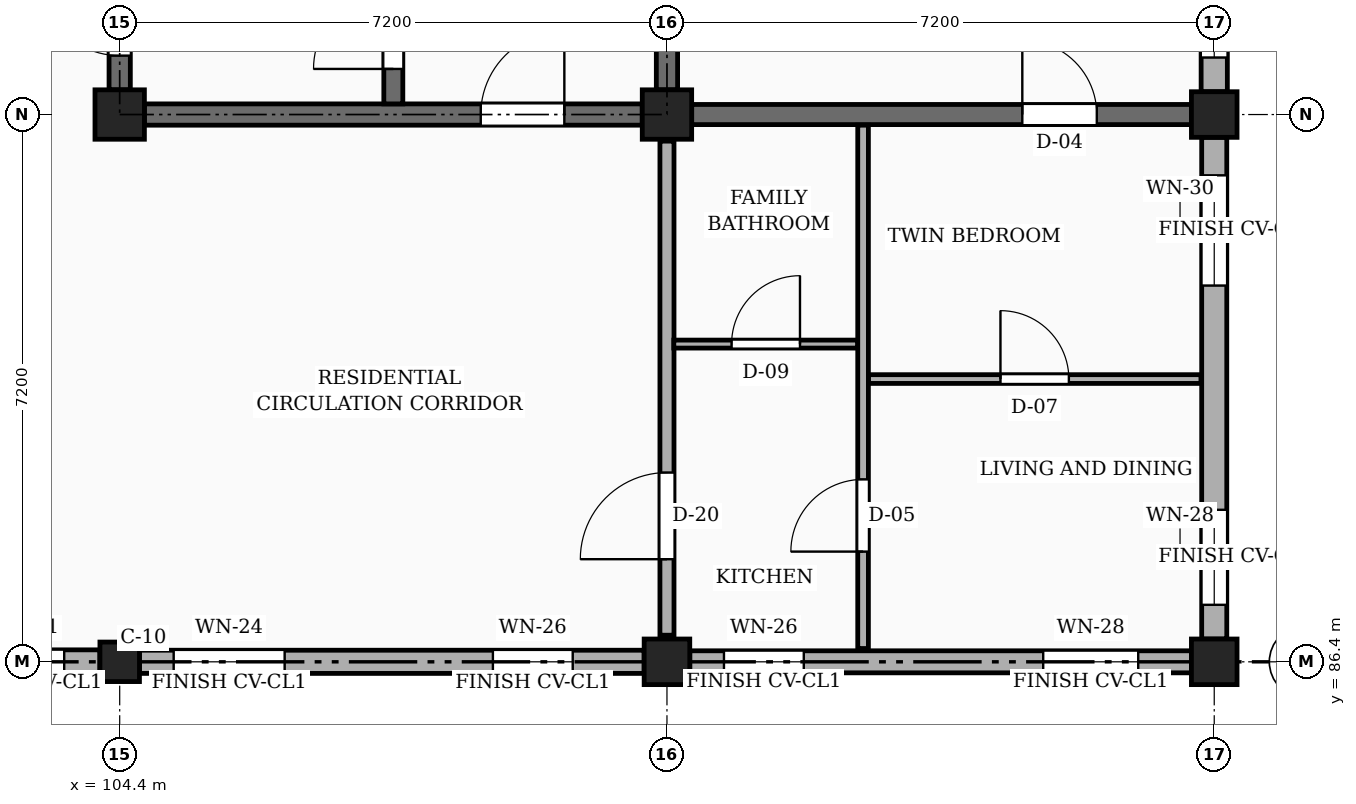
"""IFC4 building model, lengths in metres.
Left out: names, types, materials, properties, quantities, classifications, styles, units other than length and angle.
Written with IfcOpenShell. Run it as: python <this file> out.ifc"""

import sys

from ifc_helpers import new_model, si_unit, direction, frame, frame_2d, origin, origin_2d, place, context, subcontext, project, spatial, rectangle, circle, extrude, element, fill, save


model = new_model("IFC4")
c1 = context("Model", 3, precision=1e-05, world=origin(), true_north=direction((0.0, 1.0)))
c2 = subcontext(c1, "Body", "Model", "MODEL_VIEW")
j1 = project(units=[si_unit("LENGTHUNIT", "METRE"), si_unit("PLANEANGLEUNIT", "RADIAN")], contexts=[c1])
p1 = place(None, origin())
s1 = spatial("IfcSite", under=j1, at=p1, CompositionType="ELEMENT")
p2 = place(p1, origin())
s2 = spatial("IfcBuilding", under=s1, at=p2, CompositionType="ELEMENT")
p3 = place(p2, origin())
s3 = spatial("IfcBuildingStorey", under=s2, at=p3, CompositionType="ELEMENT", Elevation=0.0)
p4 = place(p3, frame((104.4, 86.4, 0.0), z_axis=(0.0, 0.0, 1.0), x_axis=(1.0, 0.0, 0.0)))
e1 = element("IfcColumn", 1, at=p4, inside=s3, PredefinedType="COLUMN", context=c2, shape_type="SweptSolid", body=[
    extrude(circle(Radius=0.26, at=origin_2d()), origin(), (0.0, 0.0, 1.0), 4.5),
])
p5 = place(p3, frame((104.4, 93.6, 0.0), z_axis=(0.0, 0.0, 1.0), x_axis=(1.0, 0.0, 0.0)))
e2 = element("IfcColumn", 2, at=p5, inside=s3, PredefinedType="COLUMN", context=c2, shape_type="SweptSolid", body=[
    extrude(rectangle(XDim=0.65, YDim=0.65, at=origin_2d()), origin(), (0.0, 0.0, 1.0), 4.5),
])
p6 = place(p3, frame((111.6, 86.4, 0.0), z_axis=(0.0, 0.0, 1.0), x_axis=(1.0, 0.0, 0.0)))
e3 = element("IfcColumn", 3, at=p6, inside=s3, PredefinedType="COLUMN", context=c2, shape_type="SweptSolid", body=[
    extrude(rectangle(XDim=0.6, YDim=0.6, at=origin_2d()), origin(), (0.0, 0.0, 1.0), 4.5),
])
p7 = place(p3, frame((111.6, 93.6, 0.0), z_axis=(0.0, 0.0, 1.0), x_axis=(1.0, 0.0, 0.0)))
e4 = element("IfcColumn", 4, at=p7, inside=s3, PredefinedType="COLUMN", context=c2, shape_type="SweptSolid", body=[
    extrude(rectangle(XDim=0.65, YDim=0.65, at=origin_2d()), origin(), (0.0, 0.0, 1.0), 4.5),
])
for number, where, z_axis, x_axis in (
    (5, (118.8, 86.4, 0.0), (0.0, 0.0, 1.0), (1.0, 0.0, 0.0)),
    (6, (118.8, 93.6, 0.0), (0.0, 0.0, 1.0), (1.0, 0.0, 0.0)),
):
    element("IfcColumn", number, at=place(p3, frame(where, z_axis=z_axis, x_axis=x_axis)), inside=s3, PredefinedType="COLUMN", context=c2, shape_type="SweptSolid", body=[
        extrude(rectangle(XDim=0.6, YDim=0.6, at=origin_2d()), origin(), (0.0, 0.0, 1.0), 4.5),
    ])
p8 = place(p3, frame((111.925, 93.6, 0.0), z_axis=(0.0, 0.0, 1.0), x_axis=(1.0, 0.0, 0.0)))
e7 = element("IfcWall", 7, at=p8, inside=s3, PredefinedType="SOLIDWALL", context=c2, shape_type="SweptSolid", body=[
    extrude(rectangle(XDim=6.575, YDim=0.265, at=frame_2d((3.288, 0.0))), origin(), (0.0, 0.0, 1.0), 3.54),
])
p9 = place(p8, frame((4.35, 0.0, 0.0)))
e8 = element("IfcOpeningElement", 8, at=p9, cuts=e7, PredefinedType="OPENING", context=c2, shape_type="SweptSolid", body=[
    extrude(rectangle(XDim=0.98, YDim=2.12, at=frame_2d((0.49, 1.06))), frame((0.0, 0.143, 0.0), z_axis=(0.0, -1.0, 0.0), x_axis=(1.0, 0.0, 0.0)), (0.0, 0.0, 1.0), 0.285),
])
p10 = place(p3, frame((97.5, 86.4, 0.0), z_axis=(0.0, 0.0, 1.0), x_axis=(1.0, 0.0, 0.0)))
e9 = element("IfcWall", 9, at=p10, inside=s3, PredefinedType="SOLIDWALL", context=c2, shape_type="SweptSolid", body=[
    extrude(rectangle(XDim=6.64, YDim=0.315, at=frame_2d((3.32, 0.0))), origin(), (0.0, 0.0, 1.0), 3.81),
])
p11 = place(p10, frame((1.82, 0.0, 0.78)))
e10 = element("IfcOpeningElement", 10, at=p11, cuts=e9, PredefinedType="OPENING", context=c2, shape_type="SweptSolid", body=[
    extrude(rectangle(XDim=1.3, YDim=1.36, at=frame_2d((0.65, 0.68))), frame((0.0, 0.167, 0.0), z_axis=(0.0, -1.0, 0.0), x_axis=(1.0, 0.0, 0.0)), (0.0, 0.0, 1.0), 0.335),
])
p12 = place(p10, frame((5.13, 0.0, 0.78)))
e11 = element("IfcOpeningElement", 11, at=p12, cuts=e9, PredefinedType="OPENING", context=c2, shape_type="SweptSolid", body=[
    extrude(rectangle(XDim=1.04, YDim=1.26, at=frame_2d((0.52, 0.63))), frame((0.0, 0.167, 0.0), z_axis=(0.0, -1.0, 0.0), x_axis=(1.0, 0.0, 0.0)), (0.0, 0.0, 1.0), 0.335),
])
p13 = place(p3, frame((104.66, 86.4, 0.0), z_axis=(0.0, 0.0, 1.0), x_axis=(1.0, 0.0, 0.0)))
e12 = element("IfcWall", 12, at=p13, inside=s3, PredefinedType="SOLIDWALL", context=c2, shape_type="SweptSolid", body=[
    extrude(rectangle(XDim=6.64, YDim=0.305, at=frame_2d((3.32, 0.0))), origin(), (0.0, 0.0, 1.0), 3.81),
])
p14 = place(p13, frame((0.45, 0.0, 0.78)))
e13 = element("IfcOpeningElement", 13, at=p14, cuts=e12, PredefinedType="OPENING", context=c2, shape_type="SweptSolid", body=[
    extrude(rectangle(XDim=1.46, YDim=1.36, at=frame_2d((0.73, 0.68))), frame((0.0, 0.163, 0.0), z_axis=(0.0, -1.0, 0.0), x_axis=(1.0, 0.0, 0.0)), (0.0, 0.0, 1.0), 0.325),
])
p15 = place(p13, frame((4.65, 0.0, 0.78)))
e14 = element("IfcOpeningElement", 14, at=p15, cuts=e12, PredefinedType="OPENING", context=c2, shape_type="SweptSolid", body=[
    extrude(rectangle(XDim=1.05, YDim=1.44, at=frame_2d((0.525, 0.72))), frame((0.0, 0.163, 0.0), z_axis=(0.0, -1.0, 0.0), x_axis=(1.0, 0.0, 0.0)), (0.0, 0.0, 1.0), 0.325),
])
p16 = place(p3, frame((111.9, 86.4, 0.0), z_axis=(0.0, 0.0, 1.0), x_axis=(1.0, 0.0, 0.0)))
e15 = element("IfcWall", 15, at=p16, inside=s3, PredefinedType="SOLIDWALL", context=c2, shape_type="SweptSolid", body=[
    extrude(rectangle(XDim=6.6, YDim=0.29, at=frame_2d((3.3, 0.0))), origin(), (0.0, 0.0, 1.0), 3.81),
])
p17 = place(p16, frame((0.45, 0.0, 0.78)))
e16 = element("IfcOpeningElement", 16, at=p17, cuts=e15, PredefinedType="OPENING", context=c2, shape_type="SweptSolid", body=[
    extrude(rectangle(XDim=1.05, YDim=1.44, at=frame_2d((0.525, 0.72))), frame((0.0, 0.155, 0.0), z_axis=(0.0, -1.0, 0.0), x_axis=(1.0, 0.0, 0.0)), (0.0, 0.0, 1.0), 0.31),
])
p18 = place(p16, frame((4.65, 0.0, 0.78)))
e17 = element("IfcOpeningElement", 17, at=p18, cuts=e15, PredefinedType="OPENING", context=c2, shape_type="SweptSolid", body=[
    extrude(rectangle(XDim=1.25, YDim=1.44, at=frame_2d((0.625, 0.72))), frame((0.0, 0.155, 0.0), z_axis=(0.0, -1.0, 0.0), x_axis=(1.0, 0.0, 0.0)), (0.0, 0.0, 1.0), 0.31),
])
p19 = place(p3, frame((118.8, 86.7, 0.0), z_axis=(0.0, 0.0, 1.0), x_axis=(0.0, 1.0, 0.0)))
e18 = element("IfcWall", 18, at=p19, inside=s3, PredefinedType="SOLIDWALL", context=c2, shape_type="SweptSolid", body=[
    extrude(rectangle(XDim=6.6, YDim=0.33, at=frame_2d((3.3, 0.0))), origin(), (0.0, 0.0, 1.0), 3.81),
])
p20 = place(p19, frame((0.45, 0.0, 0.78)))
e19 = element("IfcOpeningElement", 19, at=p20, cuts=e18, PredefinedType="OPENING", context=c2, shape_type="SweptSolid", body=[
    extrude(rectangle(XDim=1.25, YDim=1.44, at=frame_2d((0.625, 0.72))), frame((0.0, 0.175, 0.0), z_axis=(0.0, -1.0, 0.0), x_axis=(1.0, 0.0, 0.0)), (0.0, 0.0, 1.0), 0.35),
])
p21 = place(p19, frame((4.65, 0.0, 0.78)))
e20 = element("IfcOpeningElement", 20, at=p21, cuts=e18, PredefinedType="OPENING", context=c2, shape_type="SweptSolid", body=[
    extrude(rectangle(XDim=1.45, YDim=1.44, at=frame_2d((0.725, 0.72))), frame((0.0, 0.175, 0.0), z_axis=(0.0, -1.0, 0.0), x_axis=(1.0, 0.0, 0.0)), (0.0, 0.0, 1.0), 0.35),
])
p22 = place(p3, frame((118.8, 93.9, 0.0), z_axis=(0.0, 0.0, 1.0), x_axis=(0.0, 1.0, 0.0)))
e21 = element("IfcWall", 21, at=p22, inside=s3, PredefinedType="SOLIDWALL", context=c2, shape_type="SweptSolid", body=[
    extrude(rectangle(XDim=6.64, YDim=0.345, at=frame_2d((3.32, 0.0))), origin(), (0.0, 0.0, 1.0), 3.81),
])
p23 = place(p22, frame((0.45, 0.0, 0.78)))
e22 = element("IfcOpeningElement", 22, at=p23, cuts=e21, PredefinedType="OPENING", context=c2, shape_type="SweptSolid", body=[
    extrude(rectangle(XDim=1.45, YDim=1.44, at=frame_2d((0.725, 0.72))), frame((0.0, 0.183, 0.0), z_axis=(0.0, -1.0, 0.0), x_axis=(1.0, 0.0, 0.0)), (0.0, 0.0, 1.0), 0.365),
])
p24 = place(p22, frame((4.65, 0.0, 0.78)))
e23 = element("IfcOpeningElement", 23, at=p24, cuts=e21, PredefinedType="OPENING", context=c2, shape_type="SweptSolid", body=[
    extrude(rectangle(XDim=0.92, YDim=1.15, at=frame_2d((0.46, 0.575))), frame((0.0, 0.183, 0.0), z_axis=(0.0, -1.0, 0.0), x_axis=(1.0, 0.0, 0.0)), (0.0, 0.0, 1.0), 0.365),
])
p25 = place(p3, frame((104.4, 93.925, 0.0), z_axis=(0.0, 0.0, 1.0), x_axis=(0.0, 1.0, 0.0)))
e24 = element("IfcWall", 24, at=p25, inside=s3, PredefinedType="SHEAR", context=c2, shape_type="SweptSolid", body=[
    extrude(rectangle(XDim=6.55, YDim=0.28, at=frame_2d((3.275, 0.0))), origin(), (0.0, 0.0, 1.0), 4.24),
])
p26 = place(p25, frame((0.45, 0.0, 0.0)))
e25 = element("IfcOpeningElement", 25, at=p26, cuts=e24, PredefinedType="OPENING", context=c2, shape_type="SweptSolid", body=[
    extrude(rectangle(XDim=1.05, YDim=2.15, at=frame_2d((0.525, 1.075))), frame((0.0, 0.15, 0.0), z_axis=(0.0, -1.0, 0.0), x_axis=(1.0, 0.0, 0.0)), (0.0, 0.0, 1.0), 0.3),
])
p27 = place(p3, frame((111.6, 93.925, 0.0), z_axis=(0.0, 0.0, 1.0), x_axis=(0.0, 1.0, 0.0)))
e26 = element("IfcWall", 26, at=p27, inside=s3, PredefinedType="SHEAR", context=c2, shape_type="SweptSolid", body=[
    extrude(rectangle(XDim=6.55, YDim=0.28, at=frame_2d((3.275, 0.0))), origin(), (0.0, 0.0, 1.0), 4.24),
])
p28 = place(p3, frame((104.725, 93.6, 0.0), z_axis=(0.0, 0.0, 1.0), x_axis=(1.0, 0.0, 0.0)))
e27 = element("IfcWall", 27, at=p28, inside=s3, PredefinedType="SHEAR", context=c2, shape_type="SweptSolid", body=[
    extrude(rectangle(XDim=6.55, YDim=0.28, at=frame_2d((3.275, 0.0))), origin(), (0.0, 0.0, 1.0), 4.24),
])
p29 = place(p28, frame((4.425, 0.0, 0.0)))
e28 = element("IfcOpeningElement", 28, at=p29, cuts=e27, PredefinedType="OPENING", context=c2, shape_type="SweptSolid", body=[
    extrude(rectangle(XDim=1.1, YDim=2.15, at=frame_2d((0.55, 1.075))), frame((0.0, 0.15, 0.0), z_axis=(0.0, -1.0, 0.0), x_axis=(1.0, 0.0, 0.0)), (0.0, 0.0, 1.0), 0.3),
])
p30 = place(p3, frame((108.0, 93.74, 0.0), z_axis=(0.0, 0.0, 1.0), x_axis=(0.0, 1.0, 0.0)))
e29 = element("IfcWall", 29, at=p30, inside=s3, PredefinedType="SHEAR", context=c2, shape_type="SweptSolid", body=[
    extrude(rectangle(XDim=6.92, YDim=0.25, at=frame_2d((3.46, 0.0))), origin(), (0.0, 0.0, 1.0), 4.24),
])
p31 = place(p30, frame((0.46, 0.0, 0.0)))
e30 = element("IfcOpeningElement", 30, at=p31, cuts=e29, PredefinedType="OPENING", context=c2, shape_type="SweptSolid", body=[
    extrude(rectangle(XDim=1.05, YDim=2.15, at=frame_2d((0.525, 1.075))), frame((0.0, 0.135, 0.0), z_axis=(0.0, -1.0, 0.0), x_axis=(1.0, 0.0, 0.0)), (0.0, 0.0, 1.0), 0.27),
])
p32 = place(p3, frame((111.6, 86.75, 0.0), z_axis=(0.0, 0.0, 1.0), x_axis=(0.0, 1.0, 0.0)))
e31 = element("IfcWall", 31, at=p32, inside=s3, PredefinedType="PARTITIONING", context=c2, shape_type="SweptSolid", body=[
    extrude(rectangle(XDim=6.5, YDim=0.185, at=frame_2d((3.25, 0.0))), origin(), (0.0, 0.0, 1.0), 3.49),
])
p33 = place(p32, frame((1.0, 0.0, 0.0)))
e32 = element("IfcOpeningElement", 32, at=p33, cuts=e31, PredefinedType="OPENING", context=c2, shape_type="SweptSolid", body=[
    extrude(rectangle(XDim=1.14, YDim=2.18, at=frame_2d((0.57, 1.09))), frame((0.0, 0.103, 0.0), z_axis=(0.0, -1.0, 0.0), x_axis=(1.0, 0.0, 0.0)), (0.0, 0.0, 1.0), 0.205),
])
p34 = place(p3, frame((114.25, 90.12, 0.0), z_axis=(0.0, 0.0, 1.0), x_axis=(1.0, 0.0, 0.0)))
e33 = element("IfcWall", 33, at=p34, inside=s3, PredefinedType="PARTITIONING", context=c2, shape_type="SweptSolid", body=[
    extrude(rectangle(XDim=4.375, YDim=0.115, at=frame_2d((2.188, 0.0))), origin(), (0.0, 0.0, 1.0), 3.675),
])
p35 = place(p34, frame((1.738, 0.0, 0.0)))
e34 = element("IfcOpeningElement", 34, at=p35, cuts=e33, PredefinedType="OPENING", context=c2, shape_type="SweptSolid", body=[
    extrude(rectangle(XDim=0.9, YDim=2.1, at=frame_2d((0.45, 1.05))), frame((0.0, 0.067, 0.0), z_axis=(0.0, -1.0, 0.0), x_axis=(1.0, 0.0, 0.0)), (0.0, 0.0, 1.0), 0.135),
])
p36 = place(p3, frame((111.69, 90.58, 0.0), z_axis=(0.0, 0.0, 1.0), x_axis=(1.0, 0.0, 0.0)))
e35 = element("IfcWall", 35, at=p36, inside=s3, PredefinedType="PARTITIONING", context=c2, shape_type="SweptSolid", body=[
    extrude(rectangle(XDim=2.42, YDim=0.105, at=frame_2d((1.21, 0.0))), origin(), (0.0, 0.0, 1.0), 3.675),
])
p37 = place(p36, frame((0.76, 0.0, 0.0)))
e36 = element("IfcOpeningElement", 36, at=p37, cuts=e35, PredefinedType="OPENING", context=c2, shape_type="SweptSolid", body=[
    extrude(rectangle(XDim=0.9, YDim=2.05, at=frame_2d((0.45, 1.025))), frame((0.0, 0.062, 0.0), z_axis=(0.0, -1.0, 0.0), x_axis=(1.0, 0.0, 0.0)), (0.0, 0.0, 1.0), 0.125),
])
p38 = place(p3, frame((114.18, 86.575, 0.0), z_axis=(0.0, 0.0, 1.0), x_axis=(0.0, 1.0, 0.0)))
e37 = element("IfcWall", 37, at=p38, inside=s3, PredefinedType="PARTITIONING", context=c2, shape_type="SweptSolid", body=[
    extrude(rectangle(XDim=6.885, YDim=0.14, at=frame_2d((3.442, 0.0))), origin(), (0.0, 0.0, 1.0), 3.675),
])
p39 = place(p38, frame((1.275, 0.0, 0.0)))
e38 = element("IfcOpeningElement", 38, at=p39, cuts=e37, PredefinedType="OPENING", context=c2, shape_type="SweptSolid", body=[
    extrude(rectangle(XDim=0.95, YDim=2.1, at=frame_2d((0.475, 1.05))), frame((0.0, 0.08, 0.0), z_axis=(0.0, -1.0, 0.0), x_axis=(1.0, 0.0, 0.0)), (0.0, 0.0, 1.0), 0.16),
])
p40 = place(p12, origin())
e39 = element("IfcWindow", 39, at=p40, inside=s3, PartitioningType="SINGLE_PANEL", PredefinedType="WINDOW", context=c2, shape_type="SweptSolid", body=[
    extrude(rectangle(XDim=1.04, YDim=1.26, at=frame_2d((0.52, 0.63))), frame((0.0, 0.03, 0.0), z_axis=(0.0, -1.0, 0.0), x_axis=(1.0, 0.0, 0.0)), (0.0, 0.0, 1.0), 0.06),
])
fill(e11, e39)
p41 = place(p14, origin())
e40 = element("IfcWindow", 40, at=p41, inside=s3, PartitioningType="SINGLE_PANEL", PredefinedType="WINDOW", context=c2, shape_type="SweptSolid", body=[
    extrude(rectangle(XDim=1.46, YDim=1.36, at=frame_2d((0.73, 0.68))), frame((0.0, 0.03, 0.0), z_axis=(0.0, -1.0, 0.0), x_axis=(1.0, 0.0, 0.0)), (0.0, 0.0, 1.0), 0.06),
])
fill(e13, e40)
p42 = place(p15, origin())
e41 = element("IfcWindow", 41, at=p42, inside=s3, PartitioningType="SINGLE_PANEL", PredefinedType="WINDOW", context=c2, shape_type="SweptSolid", body=[
    extrude(rectangle(XDim=1.05, YDim=1.44, at=frame_2d((0.525, 0.72))), frame((0.0, 0.03, 0.0), z_axis=(0.0, -1.0, 0.0), x_axis=(1.0, 0.0, 0.0)), (0.0, 0.0, 1.0), 0.06),
])
fill(e14, e41)
p43 = place(p17, origin())
e42 = element("IfcWindow", 42, at=p43, inside=s3, PartitioningType="SINGLE_PANEL", PredefinedType="WINDOW", context=c2, shape_type="SweptSolid", body=[
    extrude(rectangle(XDim=1.05, YDim=1.44, at=frame_2d((0.525, 0.72))), frame((0.0, 0.03, 0.0), z_axis=(0.0, -1.0, 0.0), x_axis=(1.0, 0.0, 0.0)), (0.0, 0.0, 1.0), 0.06),
])
fill(e16, e42)
p44 = place(p18, origin())
e43 = element("IfcWindow", 43, at=p44, inside=s3, PartitioningType="SINGLE_PANEL", PredefinedType="WINDOW", context=c2, shape_type="SweptSolid", body=[
    extrude(rectangle(XDim=1.25, YDim=1.44, at=frame_2d((0.625, 0.72))), frame((0.0, 0.03, 0.0), z_axis=(0.0, -1.0, 0.0), x_axis=(1.0, 0.0, 0.0)), (0.0, 0.0, 1.0), 0.06),
])
fill(e17, e43)
p45 = place(p20, origin())
e44 = element("IfcWindow", 44, at=p45, inside=s3, PartitioningType="SINGLE_PANEL", PredefinedType="WINDOW", context=c2, shape_type="SweptSolid", body=[
    extrude(rectangle(XDim=1.25, YDim=1.44, at=frame_2d((0.625, 0.72))), frame((0.0, 0.03, 0.0), z_axis=(0.0, -1.0, 0.0), x_axis=(1.0, 0.0, 0.0)), (0.0, 0.0, 1.0), 0.06),
])
fill(e19, e44)
p46 = place(p21, origin())
e45 = element("IfcWindow", 45, at=p46, inside=s3, PartitioningType="SINGLE_PANEL", PredefinedType="WINDOW", context=c2, shape_type="SweptSolid", body=[
    extrude(rectangle(XDim=1.45, YDim=1.44, at=frame_2d((0.725, 0.72))), frame((0.0, 0.03, 0.0), z_axis=(0.0, -1.0, 0.0), x_axis=(1.0, 0.0, 0.0)), (0.0, 0.0, 1.0), 0.06),
])
fill(e20, e45)
p47 = place(p23, origin())
e46 = element("IfcWindow", 46, at=p47, inside=s3, PartitioningType="SINGLE_PANEL", PredefinedType="WINDOW", context=c2, shape_type="SweptSolid", body=[
    extrude(rectangle(XDim=1.45, YDim=1.44, at=frame_2d((0.725, 0.72))), frame((0.0, 0.03, 0.0), z_axis=(0.0, -1.0, 0.0), x_axis=(1.0, 0.0, 0.0)), (0.0, 0.0, 1.0), 0.06),
])
fill(e22, e46)
p48 = place(p26, origin())
e47 = element("IfcDoor", 47, at=p48, inside=s3, OperationType="SINGLE_SWING_RIGHT", PredefinedType="DOOR", context=c2, shape_type="SweptSolid", body=[
    extrude(rectangle(XDim=1.05, YDim=2.15, at=frame_2d((0.525, 1.075))), frame((0.0, 0.025, 0.0), z_axis=(0.0, -1.0, 0.0), x_axis=(1.0, 0.0, 0.0)), (0.0, 0.0, 1.0), 0.05),
])
fill(e25, e47)
p49 = place(p29, frame((1.1, 0.0, 0.0), z_axis=(0.0, 0.0, 1.0), x_axis=(-1.0, 0.0, 0.0)))
e48 = element("IfcDoor", 48, at=p49, inside=s3, OperationType="SINGLE_SWING_RIGHT", PredefinedType="DOOR", context=c2, shape_type="SweptSolid", body=[
    extrude(rectangle(XDim=1.1, YDim=2.15, at=frame_2d((0.55, 1.075))), frame((0.0, 0.025, 0.0), z_axis=(0.0, -1.0, 0.0), x_axis=(1.0, 0.0, 0.0)), (0.0, 0.0, 1.0), 0.05),
])
fill(e28, e48)
p50 = place(p31, frame((1.05, 0.0, 0.0), z_axis=(0.0, 0.0, 1.0), x_axis=(-1.0, 0.0, 0.0)))
e49 = element("IfcDoor", 49, at=p50, inside=s3, OperationType="SINGLE_SWING_LEFT", PredefinedType="DOOR", context=c2, shape_type="SweptSolid", body=[
    extrude(rectangle(XDim=1.05, YDim=2.15, at=frame_2d((0.525, 1.075))), frame((0.0, 0.025, 0.0), z_axis=(0.0, -1.0, 0.0), x_axis=(1.0, 0.0, 0.0)), (0.0, 0.0, 1.0), 0.05),
])
fill(e30, e49)
p51 = place(p33, origin())
e50 = element("IfcDoor", 50, at=p51, inside=s3, OperationType="SINGLE_SWING_LEFT", PredefinedType="DOOR", context=c2, shape_type="SweptSolid", body=[
    extrude(rectangle(XDim=1.14, YDim=2.18, at=frame_2d((0.57, 1.09))), frame((0.0, 0.025, 0.0), z_axis=(0.0, -1.0, 0.0), x_axis=(1.0, 0.0, 0.0)), (0.0, 0.0, 1.0), 0.05),
])
fill(e32, e50)
p52 = place(p35, origin())
e51 = element("IfcDoor", 51, at=p52, inside=s3, OperationType="SINGLE_SWING_LEFT", PredefinedType="DOOR", context=c2, shape_type="SweptSolid", body=[
    extrude(rectangle(XDim=0.9, YDim=2.1, at=frame_2d((0.45, 1.05))), frame((0.0, 0.025, 0.0), z_axis=(0.0, -1.0, 0.0), x_axis=(1.0, 0.0, 0.0)), (0.0, 0.0, 1.0), 0.05),
])
fill(e34, e51)
p53 = place(p37, origin())
e52 = element("IfcDoor", 52, at=p53, inside=s3, OperationType="SINGLE_SWING_RIGHT", PredefinedType="DOOR", context=c2, shape_type="SweptSolid", body=[
    extrude(rectangle(XDim=0.9, YDim=2.05, at=frame_2d((0.45, 1.025))), frame((0.0, 0.025, 0.0), z_axis=(0.0, -1.0, 0.0), x_axis=(1.0, 0.0, 0.0)), (0.0, 0.0, 1.0), 0.05),
])
fill(e36, e52)
p54 = place(p39, origin())
e53 = element("IfcDoor", 53, at=p54, inside=s3, OperationType="SINGLE_SWING_LEFT", PredefinedType="DOOR", context=c2, shape_type="SweptSolid", body=[
    extrude(rectangle(XDim=0.95, YDim=2.1, at=frame_2d((0.475, 1.05))), frame((0.0, 0.025, 0.0), z_axis=(0.0, -1.0, 0.0), x_axis=(1.0, 0.0, 0.0)), (0.0, 0.0, 1.0), 0.05),
])
fill(e38, e53)
p55 = place(p9, origin())
e54 = element("IfcDoor", 54, at=p55, inside=s3, OperationType="SINGLE_SWING_LEFT", PredefinedType="DOOR", context=c2, shape_type="SweptSolid", body=[
    extrude(rectangle(XDim=0.98, YDim=2.12, at=frame_2d((0.49, 1.06))), frame((0.0, 0.025, 0.0), z_axis=(0.0, -1.0, 0.0), x_axis=(1.0, 0.0, 0.0)), (0.0, 0.0, 1.0), 0.05),
])
fill(e8, e54)
save(model, sys.argv[1])
